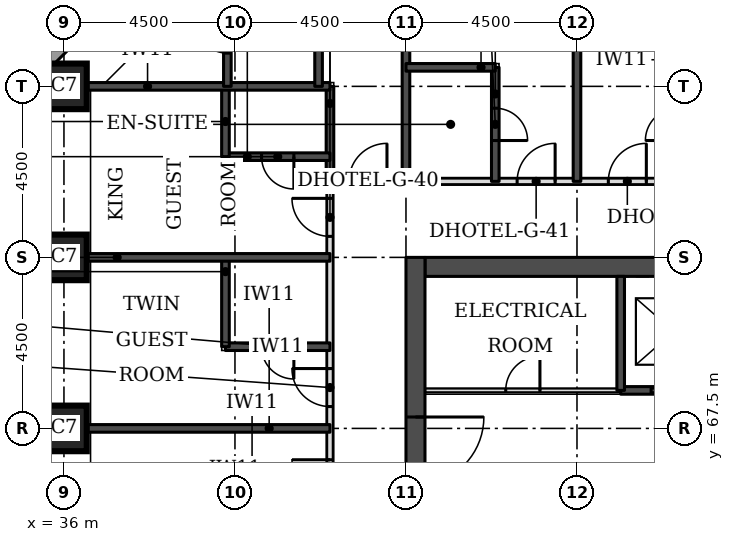
"""IFC4 building model, lengths in metres.
Left out: names, types, materials, properties, quantities, classifications, styles, units other than length and angle.
Written with IfcOpenShell. Run it as: python <this file> out.ifc"""

import sys

from ifc_helpers import new_model, si_unit, direction, frame, frame_2d, origin, origin_2d, place, context, subcontext, project, spatial, rectangle, extrude, element, fill, save


model = new_model("IFC4")
c1 = context("Model", 3, precision=1e-05, world=origin(), true_north=direction((0.0, 1.0)))
c2 = subcontext(c1, "Body", "Model", "MODEL_VIEW")
j1 = project(units=[si_unit("LENGTHUNIT", "METRE"), si_unit("PLANEANGLEUNIT", "RADIAN")], contexts=[c1])
p1 = place(None, origin())
s1 = spatial("IfcSite", under=j1, at=p1, CompositionType="ELEMENT")
p2 = place(p1, origin())
s2 = spatial("IfcBuilding", under=s1, at=p2, CompositionType="ELEMENT")
p3 = place(p2, frame((0.0, 0.0, 66.0)))
s3 = spatial("IfcBuildingStorey", under=s2, at=p3, CompositionType="ELEMENT", Elevation=66.0)
for number, where, z_axis, x_axis in (
    (1, (36.0, 67.5, 0.0), (0.0, 0.0, 1.0), (1.0, 0.0, 0.0)),
    (2, (36.0, 72.0, 0.0), (0.0, 0.0, 1.0), (1.0, 0.0, 0.0)),
    (3, (36.0, 76.5, 0.0), (0.0, 0.0, 1.0), (1.0, 0.0, 0.0)),
):
    element("IfcColumn", number, at=place(p3, frame(where, z_axis=z_axis, x_axis=x_axis)), inside=s3, PredefinedType="COLUMN", context=c2, shape_type="SweptSolid", body=[
        extrude(rectangle(XDim=1.2, YDim=1.2, at=origin_2d()), origin(), (0.0, 0.0, 1.0), 3.3),
    ])
p4 = place(p3, frame((45.5, 71.75, 0.0), z_axis=(0.0, 0.0, 1.0), x_axis=(1.0, 0.0, 0.0)))
e4 = element("IfcWall", 4, at=p4, inside=s3, PredefinedType="SHEAR", context=c2, shape_type="SweptSolid", body=[
    extrude(rectangle(XDim=21.5, YDim=0.5, at=frame_2d((10.75, 0.0))), origin(), (0.0, 0.0, 1.0), 3.3),
])
p5 = place(p3, frame((45.25, 49.5, 0.0), z_axis=(0.0, 0.0, 1.0), x_axis=(0.0, 1.0, 0.0)))
e5 = element("IfcWall", 5, at=p5, inside=s3, PredefinedType="SHEAR", context=c2, shape_type="SweptSolid", body=[
    extrude(rectangle(XDim=22.5, YDim=0.5, at=frame_2d((11.25, 0.0))), origin(), (0.0, 0.0, 1.0), 3.3),
])
p6 = place(p5, frame((4.2, 0.0, 0.0)))
e6 = element("IfcOpeningElement", 6, at=p6, cuts=e5, PredefinedType="OPENING", context=c2, shape_type="SweptSolid", body=[
    extrude(rectangle(XDim=1.8, YDim=2.1, at=frame_2d((0.9, 1.05))), frame((0.0, 0.26, 0.0), z_axis=(0.0, -1.0, 0.0), x_axis=(1.0, 0.0, 0.0)), (0.0, 0.0, 1.0), 0.52),
])
p7 = place(p5, frame((6.9, 0.0, 0.0)))
e7 = element("IfcOpeningElement", 7, at=p7, cuts=e5, PredefinedType="OPENING", context=c2, shape_type="SweptSolid", body=[
    extrude(rectangle(XDim=1.1, YDim=2.1, at=frame_2d((0.55, 1.05))), frame((0.0, 0.26, 0.0), z_axis=(0.0, -1.0, 0.0), x_axis=(1.0, 0.0, 0.0)), (0.0, 0.0, 1.0), 0.52),
])
p8 = place(p5, frame((13.6, 0.0, 0.0)))
e8 = element("IfcOpeningElement", 8, at=p8, cuts=e5, PredefinedType="OPENING", context=c2, shape_type="SweptSolid", body=[
    extrude(rectangle(XDim=1.1, YDim=2.1, at=frame_2d((0.55, 1.05))), frame((0.0, 0.26, 0.0), z_axis=(0.0, -1.0, 0.0), x_axis=(1.0, 0.0, 0.0)), (0.0, 0.0, 1.0), 0.52),
])
p9 = place(p5, frame((16.5, 0.0, 0.0)))
e9 = element("IfcOpeningElement", 9, at=p9, cuts=e5, PredefinedType="OPENING", context=c2, shape_type="SweptSolid", body=[
    extrude(rectangle(XDim=1.8, YDim=2.1, at=frame_2d((0.9, 1.05))), frame((0.0, 0.26, 0.0), z_axis=(0.0, -1.0, 0.0), x_axis=(1.0, 0.0, 0.0)), (0.0, 0.0, 1.0), 0.52),
])
p10 = place(p3, frame((40.23, 81.826, 0.0), z_axis=(0.0, 0.0, 1.0), x_axis=(-0.707106781187, -0.707106781187, 0.0)))
e10 = element("IfcWall", 10, at=p10, inside=s3, PredefinedType="STANDARD", context=c2, shape_type="SweptSolid", body=[
    extrude(rectangle(XDim=7.151, YDim=0.35, at=frame_2d((3.576, 0.0))), origin(), (0.0, 0.0, 1.0), 3.055),
])
p11 = place(p10, frame((1.926, 0.0, 0.8)))
e11 = element("IfcOpeningElement", 11, at=p11, cuts=e10, PredefinedType="OPENING", context=c2, shape_type="SweptSolid", body=[
    extrude(rectangle(XDim=3.3, YDim=1.5, at=frame_2d((1.65, 0.75))), frame((0.0, 0.185, 0.0), z_axis=(0.0, -1.0, 0.0), x_axis=(1.0, 0.0, 0.0)), (0.0, 0.0, 1.0), 0.37),
])
p12 = place(p3, frame((43.0, 56.6, 0.0), z_axis=(0.0, 0.0, 1.0), x_axis=(0.0, 1.0, 0.0)))
e12 = element("IfcWall", 12, at=p12, inside=s3, PredefinedType="PARTITIONING", context=c2, shape_type="SweptSolid", body=[
    extrude(rectangle(XDim=17.4, YDim=0.15, at=frame_2d((8.7, 0.0))), origin(), (0.0, 0.0, 1.0), 3.08),
])
p13 = place(p12, frame((9.075, 0.0, 0.0)))
e13 = element("IfcOpeningElement", 13, at=p13, cuts=e12, PredefinedType="OPENING", context=c2, shape_type="SweptSolid", body=[
    extrude(rectangle(XDim=1.0, YDim=2.1, at=frame_2d((0.5, 1.05))), frame((0.0, 0.085, 0.0), z_axis=(0.0, -1.0, 0.0), x_axis=(1.0, 0.0, 0.0)), (0.0, 0.0, 1.0), 0.17),
])
p14 = place(p12, frame((11.475, 0.0, 0.0)))
e14 = element("IfcOpeningElement", 14, at=p14, cuts=e12, PredefinedType="OPENING", context=c2, shape_type="SweptSolid", body=[
    extrude(rectangle(XDim=1.0, YDim=2.1, at=frame_2d((0.5, 1.05))), frame((0.0, 0.085, 0.0), z_axis=(0.0, -1.0, 0.0), x_axis=(1.0, 0.0, 0.0)), (0.0, 0.0, 1.0), 0.17),
])
p15 = place(p12, frame((15.953, 0.0, 0.0)))
e15 = element("IfcOpeningElement", 15, at=p15, cuts=e12, PredefinedType="OPENING", context=c2, shape_type="SweptSolid", body=[
    extrude(rectangle(XDim=1.0, YDim=2.1, at=frame_2d((0.5, 1.05))), frame((0.0, 0.085, 0.0), z_axis=(0.0, -1.0, 0.0), x_axis=(1.0, 0.0, 0.0)), (0.0, 0.0, 1.0), 0.17),
])
p16 = place(p3, frame((43.0, 74.0, 0.0), z_axis=(0.0, 0.0, 1.0), x_axis=(1.0, 0.0, 0.0)))
e16 = element("IfcWall", 16, at=p16, inside=s3, PredefinedType="PARTITIONING", context=c2, shape_type="SweptSolid", body=[
    extrude(rectangle(XDim=26.5, YDim=0.15, at=frame_2d((13.25, 0.0))), origin(), (0.0, 0.0, 1.0), 3.08),
])
p17 = place(p16, frame((4.925, 0.0, 0.0)))
e17 = element("IfcOpeningElement", 17, at=p17, cuts=e16, PredefinedType="OPENING", context=c2, shape_type="SweptSolid", body=[
    extrude(rectangle(XDim=1.0, YDim=2.1, at=frame_2d((0.5, 1.05))), frame((0.0, 0.085, 0.0), z_axis=(0.0, -1.0, 0.0), x_axis=(1.0, 0.0, 0.0)), (0.0, 0.0, 1.0), 0.17),
])
p18 = place(p16, frame((7.325, 0.0, 0.0)))
e18 = element("IfcOpeningElement", 18, at=p18, cuts=e16, PredefinedType="OPENING", context=c2, shape_type="SweptSolid", body=[
    extrude(rectangle(XDim=1.0, YDim=2.1, at=frame_2d((0.5, 1.05))), frame((0.0, 0.085, 0.0), z_axis=(0.0, -1.0, 0.0), x_axis=(1.0, 0.0, 0.0)), (0.0, 0.0, 1.0), 0.17),
])
p19 = place(p16, frame((13.925, 0.0, 0.0)))
e19 = element("IfcOpeningElement", 19, at=p19, cuts=e16, PredefinedType="OPENING", context=c2, shape_type="SweptSolid", body=[
    extrude(rectangle(XDim=1.0, YDim=2.1, at=frame_2d((0.5, 1.05))), frame((0.0, 0.085, 0.0), z_axis=(0.0, -1.0, 0.0), x_axis=(1.0, 0.0, 0.0)), (0.0, 0.0, 1.0), 0.17),
])
p20 = place(p16, frame((16.325, 0.0, 0.0)))
e20 = element("IfcOpeningElement", 20, at=p20, cuts=e16, PredefinedType="OPENING", context=c2, shape_type="SweptSolid", body=[
    extrude(rectangle(XDim=1.0, YDim=2.1, at=frame_2d((0.5, 1.05))), frame((0.0, 0.085, 0.0), z_axis=(0.0, -1.0, 0.0), x_axis=(1.0, 0.0, 0.0)), (0.0, 0.0, 1.0), 0.17),
])
p21 = place(p16, frame((22.925, 0.0, 0.0)))
e21 = element("IfcOpeningElement", 21, at=p21, cuts=e16, PredefinedType="OPENING", context=c2, shape_type="SweptSolid", body=[
    extrude(rectangle(XDim=1.0, YDim=2.1, at=frame_2d((0.5, 1.05))), frame((0.0, 0.085, 0.0), z_axis=(0.0, -1.0, 0.0), x_axis=(1.0, 0.0, 0.0)), (0.0, 0.0, 1.0), 0.17),
])
p22 = place(p16, frame((0.5, 0.0, 0.0)))
e22 = element("IfcOpeningElement", 22, at=p22, cuts=e16, PredefinedType="OPENING", context=c2, shape_type="SweptSolid", body=[
    extrude(rectangle(XDim=1.0, YDim=2.1, at=frame_2d((0.5, 1.05))), frame((0.0, 0.085, 0.0), z_axis=(0.0, -1.0, 0.0), x_axis=(1.0, 0.0, 0.0)), (0.0, 0.0, 1.0), 0.17),
])
p23 = place(p16, frame((25.0, 0.0, 0.0)))
e23 = element("IfcOpeningElement", 23, at=p23, cuts=e16, PredefinedType="OPENING", context=c2, shape_type="SweptSolid", body=[
    extrude(rectangle(XDim=1.0, YDim=2.1, at=frame_2d((0.5, 1.05))), frame((0.0, 0.085, 0.0), z_axis=(0.0, -1.0, 0.0), x_axis=(1.0, 0.0, 0.0)), (0.0, 0.0, 1.0), 0.17),
])
p24 = place(p3, frame((36.6, 67.5, 0.0), z_axis=(0.0, 0.0, 1.0), x_axis=(1.0, 0.0, 0.0)))
e24 = element("IfcWall", 24, at=p24, inside=s3, PredefinedType="SOLIDWALL", context=c2, shape_type="SweptSolid", body=[
    extrude(rectangle(XDim=6.4, YDim=0.2, at=frame_2d((3.2, 0.0))), origin(), (0.0, 0.0, 1.0), 3.08),
])
p25 = place(p3, frame((40.25, 69.65, 0.0), z_axis=(0.0, 0.0, 1.0), x_axis=(1.0, 0.0, 0.0)))
e25 = element("IfcWall", 25, at=p25, inside=s3, PredefinedType="SOLIDWALL", context=c2, shape_type="SweptSolid", body=[
    extrude(rectangle(XDim=2.75, YDim=0.2, at=frame_2d((1.375, 0.0))), origin(), (0.0, 0.0, 1.0), 3.08),
])
p26 = place(p25, frame((0.95, 0.0, 0.0)))
e26 = element("IfcOpeningElement", 26, at=p26, cuts=e25, PredefinedType="OPENING", context=c2, shape_type="SweptSolid", body=[
    extrude(rectangle(XDim=0.85, YDim=2.1, at=frame_2d((0.425, 1.05))), frame((0.0, 0.11, 0.0), z_axis=(0.0, -1.0, 0.0), x_axis=(1.0, 0.0, 0.0)), (0.0, 0.0, 1.0), 0.22),
])
p27 = place(p3, frame((40.25, 69.65, 0.0), z_axis=(0.0, 0.0, 1.0), x_axis=(0.0, 1.0, 0.0)))
e27 = element("IfcWall", 27, at=p27, inside=s3, PredefinedType="SOLIDWALL", context=c2, shape_type="SweptSolid", body=[
    extrude(rectangle(XDim=2.35, YDim=0.2, at=frame_2d((1.175, 0.0))), origin(), (0.0, 0.0, 1.0), 3.08),
])
p28 = place(p3, frame((36.6, 72.0, 0.0), z_axis=(0.0, 0.0, 1.0), x_axis=(1.0, 0.0, 0.0)))
e28 = element("IfcWall", 28, at=p28, inside=s3, PredefinedType="SOLIDWALL", context=c2, shape_type="SweptSolid", body=[
    extrude(rectangle(XDim=6.4, YDim=0.2, at=frame_2d((3.2, 0.0))), origin(), (0.0, 0.0, 1.0), 3.08),
])
p29 = place(p3, frame((43.0, 74.0, 0.0), z_axis=(0.0, 0.0, 1.0), x_axis=(0.0, 1.0, 0.0)))
e29 = element("IfcWall", 29, at=p29, inside=s3, PredefinedType="SOLIDWALL", context=c2, shape_type="SweptSolid", body=[
    extrude(rectangle(XDim=2.5, YDim=0.2, at=frame_2d((1.25, 0.0))), origin(), (0.0, 0.0, 1.0), 3.08),
])
p30 = place(p3, frame((45.0, 74.0, 0.0), z_axis=(0.0, 0.0, 1.0), x_axis=(0.0, 1.0, 0.0)))
e30 = element("IfcWall", 30, at=p30, inside=s3, PredefinedType="SOLIDWALL", context=c2, shape_type="SweptSolid", body=[
    extrude(rectangle(XDim=6.4, YDim=0.2, at=frame_2d((3.2, 0.0))), origin(), (0.0, 0.0, 1.0), 3.08),
])
p31 = place(p3, frame((47.35, 74.0, 0.0), z_axis=(0.0, 0.0, 1.0), x_axis=(0.0, 1.0, 0.0)))
e31 = element("IfcWall", 31, at=p31, inside=s3, PredefinedType="SOLIDWALL", context=c2, shape_type="SweptSolid", body=[
    extrude(rectangle(XDim=3.0, YDim=0.2, at=frame_2d((1.5, 0.0))), origin(), (0.0, 0.0, 1.0), 3.08),
])
p32 = place(p31, frame((1.075, 0.0, 0.0)))
e32 = element("IfcOpeningElement", 32, at=p32, cuts=e31, PredefinedType="OPENING", context=c2, shape_type="SweptSolid", body=[
    extrude(rectangle(XDim=0.85, YDim=2.1, at=frame_2d((0.425, 1.05))), frame((0.0, 0.11, 0.0), z_axis=(0.0, -1.0, 0.0), x_axis=(1.0, 0.0, 0.0)), (0.0, 0.0, 1.0), 0.22),
])
p33 = place(p3, frame((49.5, 74.0, 0.0), z_axis=(0.0, 0.0, 1.0), x_axis=(0.0, 1.0, 0.0)))
e33 = element("IfcWall", 33, at=p33, inside=s3, PredefinedType="SOLIDWALL", context=c2, shape_type="SweptSolid", body=[
    extrude(rectangle(XDim=6.4, YDim=0.2, at=frame_2d((3.2, 0.0))), origin(), (0.0, 0.0, 1.0), 3.08),
])
p34 = place(p3, frame((40.25, 74.65, 0.0), z_axis=(0.0, 0.0, 1.0), x_axis=(1.0, 0.0, 0.0)))
e34 = element("IfcWall", 34, at=p34, inside=s3, PredefinedType="SOLIDWALL", context=c2, shape_type="SweptSolid", body=[
    extrude(rectangle(XDim=2.75, YDim=0.2, at=frame_2d((1.375, 0.0))), origin(), (0.0, 0.0, 1.0), 3.08),
])
p35 = place(p34, frame((0.95, 0.0, 0.0)))
e35 = element("IfcOpeningElement", 35, at=p35, cuts=e34, PredefinedType="OPENING", context=c2, shape_type="SweptSolid", body=[
    extrude(rectangle(XDim=0.85, YDim=2.1, at=frame_2d((0.425, 1.05))), frame((0.0, 0.11, 0.0), z_axis=(0.0, -1.0, 0.0), x_axis=(1.0, 0.0, 0.0)), (0.0, 0.0, 1.0), 0.22),
])
p36 = place(p3, frame((40.25, 74.65, 0.0), z_axis=(0.0, 0.0, 1.0), x_axis=(0.0, 1.0, 0.0)))
e36 = element("IfcWall", 36, at=p36, inside=s3, PredefinedType="SOLIDWALL", context=c2, shape_type="SweptSolid", body=[
    extrude(rectangle(XDim=1.85, YDim=0.2, at=frame_2d((0.925, 0.0))), origin(), (0.0, 0.0, 1.0), 3.08),
])
p37 = place(p3, frame((36.6, 76.5, 0.0), z_axis=(0.0, 0.0, 1.0), x_axis=(1.0, 0.0, 0.0)))
e37 = element("IfcWall", 37, at=p37, inside=s3, PredefinedType="SOLIDWALL", context=c2, shape_type="SweptSolid", body=[
    extrude(rectangle(XDim=6.4, YDim=0.2, at=frame_2d((3.2, 0.0))), origin(), (0.0, 0.0, 1.0), 3.08),
])
p38 = place(p3, frame((40.3, 76.5, 0.0), z_axis=(0.0, 0.0, 1.0), x_axis=(0.0, 1.0, 0.0)))
e38 = element("IfcWall", 38, at=p38, inside=s3, PredefinedType="SOLIDWALL", context=c2, shape_type="SweptSolid", body=[
    extrude(rectangle(XDim=2.5, YDim=0.2, at=frame_2d((1.25, 0.0))), origin(), (0.0, 0.0, 1.0), 3.08),
])
p39 = place(p38, frame((0.875, 0.0, 0.0)))
e39 = element("IfcOpeningElement", 39, at=p39, cuts=e38, PredefinedType="OPENING", context=c2, shape_type="SweptSolid", body=[
    extrude(rectangle(XDim=0.85, YDim=2.1, at=frame_2d((0.425, 1.05))), frame((0.0, 0.11, 0.0), z_axis=(0.0, -1.0, 0.0), x_axis=(1.0, 0.0, 0.0)), (0.0, 0.0, 1.0), 0.22),
])
p40 = place(p3, frame((42.7, 76.5, 0.0), z_axis=(0.0, 0.0, 1.0), x_axis=(0.0, 1.0, 0.0)))
e40 = element("IfcWall", 40, at=p40, inside=s3, PredefinedType="SOLIDWALL", context=c2, shape_type="SweptSolid", body=[
    extrude(rectangle(XDim=2.5, YDim=0.2, at=frame_2d((1.25, 0.0))), origin(), (0.0, 0.0, 1.0), 3.08),
])
p41 = place(p3, frame((45.0, 77.0, 0.0), z_axis=(0.0, 0.0, 1.0), x_axis=(1.0, 0.0, 0.0)))
e41 = element("IfcWall", 41, at=p41, inside=s3, PredefinedType="SOLIDWALL", context=c2, shape_type="SweptSolid", body=[
    extrude(rectangle(XDim=2.35, YDim=0.2, at=frame_2d((1.175, 0.0))), origin(), (0.0, 0.0, 1.0), 3.08),
])
p42 = place(p3, frame((45.5, 68.5, 0.0), z_axis=(0.0, 0.0, 1.0), x_axis=(1.0, 0.0, 0.0)))
e42 = element("IfcWall", 42, at=p42, inside=s3, PredefinedType="PARTITIONING", context=c2, shape_type="SweptSolid", body=[
    extrude(rectangle(XDim=5.15, YDim=0.1, at=frame_2d((2.575, 0.0))), origin(), (0.0, 0.0, 1.0), 3.08),
])
p43 = place(p42, frame((2.125, 0.0, 0.0)))
e43 = element("IfcOpeningElement", 43, at=p43, cuts=e42, PredefinedType="OPENING", context=c2, shape_type="SweptSolid", body=[
    extrude(rectangle(XDim=0.9, YDim=2.1, at=frame_2d((0.45, 1.05))), frame((0.0, 0.06, 0.0), z_axis=(0.0, -1.0, 0.0), x_axis=(1.0, 0.0, 0.0)), (0.0, 0.0, 1.0), 0.12),
])
p44 = place(p3, frame((50.65, 68.5, 0.0), z_axis=(0.0, 0.0, 1.0), x_axis=(1.0, 0.0, 0.0)))
e44 = element("IfcWall", 44, at=p44, inside=s3, PredefinedType="SOLIDWALL", context=c2, shape_type="SweptSolid", body=[
    extrude(rectangle(XDim=11.2, YDim=0.2, at=frame_2d((5.6, 0.0))), origin(), (0.0, 0.0, 1.0), 3.08),
])
p45 = place(p44, frame((0.8, 0.0, 0.0)))
e45 = element("IfcOpeningElement", 45, at=p45, cuts=e44, PredefinedType="OPENING", context=c2, shape_type="SweptSolid", body=[
    extrude(rectangle(XDim=1.2, YDim=2.1, at=frame_2d((0.6, 1.05))), frame((0.0, 0.11, 0.0), z_axis=(0.0, -1.0, 0.0), x_axis=(1.0, 0.0, 0.0)), (0.0, 0.0, 1.0), 0.22),
])
p46 = place(p44, frame((3.6, 0.0, 0.0)))
e46 = element("IfcOpeningElement", 46, at=p46, cuts=e44, PredefinedType="OPENING", context=c2, shape_type="SweptSolid", body=[
    extrude(rectangle(XDim=1.2, YDim=2.1, at=frame_2d((0.6, 1.05))), frame((0.0, 0.11, 0.0), z_axis=(0.0, -1.0, 0.0), x_axis=(1.0, 0.0, 0.0)), (0.0, 0.0, 1.0), 0.22),
])
p47 = place(p44, frame((6.4, 0.0, 0.0)))
e47 = element("IfcOpeningElement", 47, at=p47, cuts=e44, PredefinedType="OPENING", context=c2, shape_type="SweptSolid", body=[
    extrude(rectangle(XDim=1.2, YDim=2.1, at=frame_2d((0.6, 1.05))), frame((0.0, 0.11, 0.0), z_axis=(0.0, -1.0, 0.0), x_axis=(1.0, 0.0, 0.0)), (0.0, 0.0, 1.0), 0.22),
])
p48 = place(p44, frame((9.2, 0.0, 0.0)))
e48 = element("IfcOpeningElement", 48, at=p48, cuts=e44, PredefinedType="OPENING", context=c2, shape_type="SweptSolid", body=[
    extrude(rectangle(XDim=1.2, YDim=2.1, at=frame_2d((0.6, 1.05))), frame((0.0, 0.11, 0.0), z_axis=(0.0, -1.0, 0.0), x_axis=(1.0, 0.0, 0.0)), (0.0, 0.0, 1.0), 0.22),
])
p49 = place(p3, frame((50.65, 68.5, 0.0), z_axis=(0.0, 0.0, 1.0), x_axis=(0.0, 1.0, 0.0)))
e49 = element("IfcWall", 49, at=p49, inside=s3, PredefinedType="SOLIDWALL", context=c2, shape_type="SweptSolid", body=[
    extrude(rectangle(XDim=3.0, YDim=0.2, at=frame_2d((1.5, 0.0))), origin(), (0.0, 0.0, 1.0), 3.08),
])
p50 = place(p13, origin())
e50 = element("IfcDoor", 50, at=p50, inside=s3, OperationType="SINGLE_SWING_RIGHT", PredefinedType="DOOR", context=c2, shape_type="SweptSolid", body=[
    extrude(rectangle(XDim=1.0, YDim=2.1, at=frame_2d((0.5, 1.05))), frame((0.0, 0.025, 0.0), z_axis=(0.0, -1.0, 0.0), x_axis=(1.0, 0.0, 0.0)), (0.0, 0.0, 1.0), 0.05),
])
fill(e13, e50)
p51 = place(p14, origin())
e51 = element("IfcDoor", 51, at=p51, inside=s3, OperationType="SINGLE_SWING_RIGHT", PredefinedType="DOOR", context=c2, shape_type="SweptSolid", body=[
    extrude(rectangle(XDim=1.0, YDim=2.1, at=frame_2d((0.5, 1.05))), frame((0.0, 0.025, 0.0), z_axis=(0.0, -1.0, 0.0), x_axis=(1.0, 0.0, 0.0)), (0.0, 0.0, 1.0), 0.05),
])
fill(e14, e51)
p52 = place(p26, frame((0.85, 0.0, 0.0), z_axis=(0.0, 0.0, 1.0), x_axis=(-1.0, 0.0, 0.0)))
e52 = element("IfcDoor", 52, at=p52, inside=s3, OperationType="SINGLE_SWING_LEFT", PredefinedType="DOOR", context=c2, shape_type="SweptSolid", body=[
    extrude(rectangle(XDim=0.85, YDim=2.1, at=frame_2d((0.425, 1.05))), frame((0.0, 0.025, 0.0), z_axis=(0.0, -1.0, 0.0), x_axis=(1.0, 0.0, 0.0)), (0.0, 0.0, 1.0), 0.05),
])
fill(e26, e52)
p53 = place(p15, origin())
e53 = element("IfcDoor", 53, at=p53, inside=s3, OperationType="SINGLE_SWING_RIGHT", PredefinedType="DOOR", context=c2, shape_type="SweptSolid", body=[
    extrude(rectangle(XDim=1.0, YDim=2.1, at=frame_2d((0.5, 1.05))), frame((0.0, 0.025, 0.0), z_axis=(0.0, -1.0, 0.0), x_axis=(1.0, 0.0, 0.0)), (0.0, 0.0, 1.0), 0.05),
])
fill(e15, e53)
p54 = place(p35, frame((0.85, 0.0, 0.0), z_axis=(0.0, 0.0, 1.0), x_axis=(-1.0, 0.0, 0.0)))
e54 = element("IfcDoor", 54, at=p54, inside=s3, OperationType="SINGLE_SWING_LEFT", PredefinedType="DOOR", context=c2, shape_type="SweptSolid", body=[
    extrude(rectangle(XDim=0.85, YDim=2.1, at=frame_2d((0.425, 1.05))), frame((0.0, 0.025, 0.0), z_axis=(0.0, -1.0, 0.0), x_axis=(1.0, 0.0, 0.0)), (0.0, 0.0, 1.0), 0.05),
])
fill(e35, e54)
p55 = place(p17, origin())
e55 = element("IfcDoor", 55, at=p55, inside=s3, OperationType="SINGLE_SWING_RIGHT", PredefinedType="DOOR", context=c2, shape_type="SweptSolid", body=[
    extrude(rectangle(XDim=1.0, YDim=2.1, at=frame_2d((0.5, 1.05))), frame((0.0, 0.025, 0.0), z_axis=(0.0, -1.0, 0.0), x_axis=(1.0, 0.0, 0.0)), (0.0, 0.0, 1.0), 0.05),
])
fill(e17, e55)
p56 = place(p32, frame((0.85, 0.0, 0.0), z_axis=(0.0, 0.0, 1.0), x_axis=(-1.0, 0.0, 0.0)))
e56 = element("IfcDoor", 56, at=p56, inside=s3, OperationType="SINGLE_SWING_RIGHT", PredefinedType="DOOR", context=c2, shape_type="SweptSolid", body=[
    extrude(rectangle(XDim=0.85, YDim=2.1, at=frame_2d((0.425, 1.05))), frame((0.0, 0.025, 0.0), z_axis=(0.0, -1.0, 0.0), x_axis=(1.0, 0.0, 0.0)), (0.0, 0.0, 1.0), 0.05),
])
fill(e32, e56)
p57 = place(p18, origin())
e57 = element("IfcDoor", 57, at=p57, inside=s3, OperationType="SINGLE_SWING_RIGHT", PredefinedType="DOOR", context=c2, shape_type="SweptSolid", body=[
    extrude(rectangle(XDim=1.0, YDim=2.1, at=frame_2d((0.5, 1.05))), frame((0.0, 0.025, 0.0), z_axis=(0.0, -1.0, 0.0), x_axis=(1.0, 0.0, 0.0)), (0.0, 0.0, 1.0), 0.05),
])
fill(e18, e57)
p58 = place(p22, origin())
e58 = element("IfcDoor", 58, at=p58, inside=s3, OperationType="SINGLE_SWING_RIGHT", PredefinedType="DOOR", context=c2, shape_type="SweptSolid", body=[
    extrude(rectangle(XDim=1.0, YDim=2.1, at=frame_2d((0.5, 1.05))), frame((0.0, 0.025, 0.0), z_axis=(0.0, -1.0, 0.0), x_axis=(1.0, 0.0, 0.0)), (0.0, 0.0, 1.0), 0.05),
])
fill(e22, e58)
p59 = place(p39, origin())
e59 = element("IfcDoor", 59, at=p59, inside=s3, OperationType="SINGLE_SWING_RIGHT", PredefinedType="DOOR", context=c2, shape_type="SweptSolid", body=[
    extrude(rectangle(XDim=0.85, YDim=2.1, at=frame_2d((0.425, 1.05))), frame((0.0, 0.025, 0.0), z_axis=(0.0, -1.0, 0.0), x_axis=(1.0, 0.0, 0.0)), (0.0, 0.0, 1.0), 0.05),
])
fill(e39, e59)
p60 = place(p45, origin())
e60 = element("IfcDoor", 60, at=p60, inside=s3, OperationType="DOUBLE_DOOR_SLIDING", PredefinedType="DOOR", context=c2, shape_type="SweptSolid", body=[
    extrude(rectangle(XDim=1.2, YDim=2.1, at=frame_2d((0.6, 1.05))), frame((0.0, 0.025, 0.0), z_axis=(0.0, -1.0, 0.0), x_axis=(1.0, 0.0, 0.0)), (0.0, 0.0, 1.0), 0.05),
])
fill(e45, e60)
p61 = place(p9, frame((1.8, 0.0, 0.0), z_axis=(0.0, 0.0, 1.0), x_axis=(-1.0, 0.0, 0.0)))
e61 = element("IfcDoor", 61, at=p61, inside=s3, OperationType="SINGLE_SWING_LEFT", PredefinedType="DOOR", context=c2, shape_type="SweptSolid", body=[
    extrude(rectangle(XDim=1.8, YDim=2.1, at=frame_2d((0.9, 1.05))), frame((0.0, 0.025, 0.0), z_axis=(0.0, -1.0, 0.0), x_axis=(1.0, 0.0, 0.0)), (0.0, 0.0, 1.0), 0.05),
])
fill(e9, e61)
p62 = place(p43, origin())
e62 = element("IfcDoor", 62, at=p62, inside=s3, OperationType="SINGLE_SWING_RIGHT", PredefinedType="DOOR", context=c2, shape_type="SweptSolid", body=[
    extrude(rectangle(XDim=0.9, YDim=2.1, at=frame_2d((0.45, 1.05))), frame((0.0, 0.025, 0.0), z_axis=(0.0, -1.0, 0.0), x_axis=(1.0, 0.0, 0.0)), (0.0, 0.0, 1.0), 0.05),
])
fill(e43, e62)
save(model, sys.argv[1])
